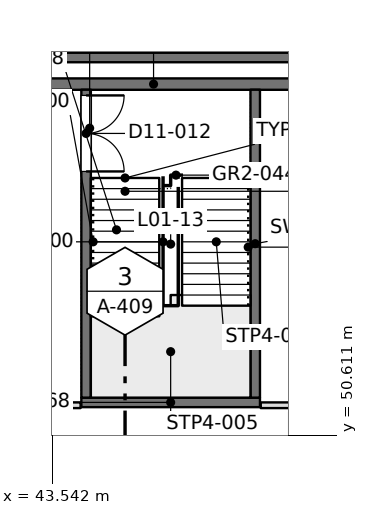
"""IFC4 building model, lengths in metres.
Left out: names, types, materials, properties, quantities, classifications, styles, units other than length and angle.
Written with IfcOpenShell. Run it as: python <this file> out.ifc"""

import sys

from ifc_helpers import new_model, si_unit, direction, frame, frame_2d, origin, place, context, subcontext, project, spatial, rectangle, extrude, element, fill, save


model = new_model("IFC4")
c1 = context("Model", 3, precision=1e-05, world=origin(), true_north=direction((0.0, 1.0)))
c2 = subcontext(c1, "Body", "Model", "MODEL_VIEW")
j1 = project(units=[si_unit("LENGTHUNIT", "METRE"), si_unit("PLANEANGLEUNIT", "RADIAN")], contexts=[c1])
p1 = place(None, origin())
s1 = spatial("IfcSite", under=j1, at=p1, CompositionType="ELEMENT")
p2 = place(p1, origin())
s2 = spatial("IfcBuilding", under=s1, at=p2, CompositionType="ELEMENT")
p3 = place(p2, frame((0.0, 0.0, 5.4)))
s3 = spatial("IfcBuildingStorey", under=s2, at=p3, CompositionType="ELEMENT", Elevation=5.4)
p4 = place(p3, frame((42.0, 59.85, 0.0), z_axis=(0.0, 0.0, 1.0), x_axis=(1.0, 0.0, 0.0)))
e1 = element("IfcWall", 1, at=p4, inside=s3, PredefinedType="SOLIDWALL", context=c2, shape_type="SweptSolid", body=[
    extrude(rectangle(XDim=8.4, YDim=0.3, at=frame_2d((4.2, 0.0))), origin(), (0.0, 0.0, 1.0), 4.3),
])
p5 = place(p3, frame((-10.275, 60.55, 0.0), z_axis=(0.0, 0.0, 1.0), x_axis=(1.0, 0.0, 0.0)))
e2 = element("IfcWall", 2, at=p5, inside=s3, PredefinedType="PARAPET", context=c2, shape_type="SweptSolid", body=[
    extrude(rectangle(XDim=70.95, YDim=0.25, at=frame_2d((35.475, 0.0))), origin(), (0.0, 0.0, 1.0), 1.1),
])
p6 = place(p3, frame((6.12, 51.4, 0.0), z_axis=(0.0, 0.0, 1.0), x_axis=(1.0, 0.0, 0.0)))
e3 = element("IfcWall", 3, at=p6, inside=s3, PredefinedType="PARTITIONING", context=c2, shape_type="SweptSolid", body=[
    extrude(rectangle(XDim=38.16, YDim=0.15, at=frame_2d((19.08, 0.0))), origin(), (0.0, 0.0, 1.0), 3.7),
])
p7 = place(p6, frame((13.98, 0.0, 0.0)))
e4 = element("IfcOpeningElement", 4, at=p7, cuts=e3, PredefinedType="OPENING", context=c2, shape_type="SweptSolid", body=[
    extrude(rectangle(XDim=1.8, YDim=2.2, at=frame_2d((0.9, 1.1))), frame((0.0, 0.085, 0.0), z_axis=(0.0, -1.0, 0.0), x_axis=(1.0, 0.0, 0.0)), (0.0, 0.0, 1.0), 0.17),
])
p8 = place(p6, frame((22.38, 0.0, 0.0)))
e5 = element("IfcOpeningElement", 5, at=p8, cuts=e3, PredefinedType="OPENING", context=c2, shape_type="SweptSolid", body=[
    extrude(rectangle(XDim=1.8, YDim=2.2, at=frame_2d((0.9, 1.1))), frame((0.0, 0.085, 0.0), z_axis=(0.0, -1.0, 0.0), x_axis=(1.0, 0.0, 0.0)), (0.0, 0.0, 1.0), 0.17),
])
p9 = place(p3, frame((49.02, 51.4, 0.0), z_axis=(0.0, 0.0, 1.0), x_axis=(1.0, 0.0, 0.0)))
e6 = element("IfcWall", 6, at=p9, inside=s3, PredefinedType="PARTITIONING", context=c2, shape_type="SweptSolid", body=[
    extrude(rectangle(XDim=2.38, YDim=0.15, at=frame_2d((1.19, 0.0))), origin(), (0.0, 0.0, 1.0), 3.7),
])
p10 = place(p3, frame((44.425, 59.702, 0.0), z_axis=(0.0, 0.0, 1.0), x_axis=(0.0, -1.0, 0.0)))
e7 = element("IfcWall", 7, at=p10, inside=s3, PredefinedType="SOLIDWALL", context=c2, shape_type="SweptSolid", body=[
    extrude(rectangle(XDim=8.102, YDim=0.25, at=frame_2d((4.051, 0.0))), origin(), (0.0, 0.0, 1.0), 4.5),
])
p11 = place(p10, frame((0.15, 0.0, 0.0)))
e8 = element("IfcOpeningElement", 8, at=p11, cuts=e7, PredefinedType="OPENING", context=c2, shape_type="SweptSolid", body=[
    extrude(rectangle(XDim=2.0, YDim=2.2, at=frame_2d((1.0, 1.1))), frame((0.0, 0.135, 0.0), z_axis=(0.0, -1.0, 0.0), x_axis=(1.0, 0.0, 0.0)), (0.0, 0.0, 1.0), 0.27),
])
p12 = place(p3, frame((48.875, 59.702, 0.0), z_axis=(0.0, 0.0, 1.0), x_axis=(0.0, -1.0, 0.0)))
e9 = element("IfcWall", 9, at=p12, inside=s3, PredefinedType="SOLIDWALL", context=c2, shape_type="SweptSolid", body=[
    extrude(rectangle(XDim=8.102, YDim=0.25, at=frame_2d((4.051, 0.0))), origin(), (0.0, 0.0, 1.0), 4.5),
])
p13 = place(p3, frame((44.3, 51.475, 0.0), z_axis=(0.0, 0.0, 1.0), x_axis=(1.0, 0.0, 0.0)))
e10 = element("IfcWall", 10, at=p13, inside=s3, PredefinedType="SOLIDWALL", context=c2, shape_type="SweptSolid", body=[
    extrude(rectangle(XDim=4.7, YDim=0.25, at=frame_2d((2.35, 0.0))), origin(), (0.0, 0.0, 1.0), 4.5),
])
p14 = place(p11, origin())
e11 = element("IfcDoor", 11, at=p14, inside=s3, OperationType="DOUBLE_DOOR_SINGLE_SWING", PredefinedType="DOOR", context=c2, shape_type="SweptSolid", body=[
    extrude(rectangle(XDim=2.0, YDim=2.2, at=frame_2d((1.0, 1.1))), frame((0.0, 0.025, 0.0), z_axis=(0.0, -1.0, 0.0), x_axis=(1.0, 0.0, 0.0)), (0.0, 0.0, 1.0), 0.05),
])
fill(e8, e11)
save(model, sys.argv[1])
